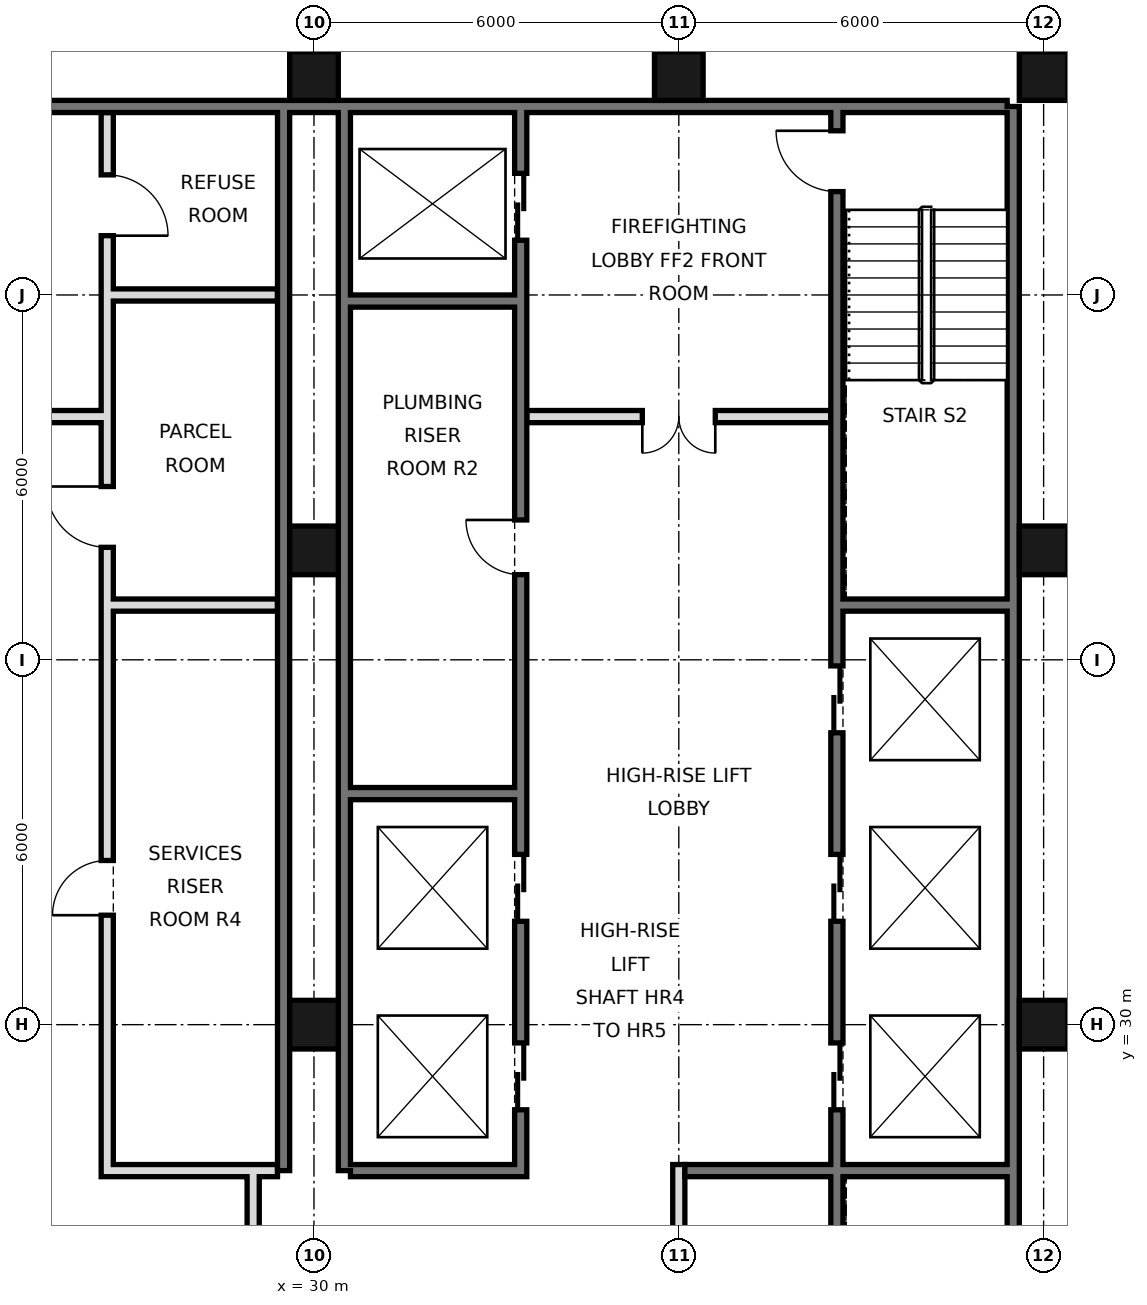
"""IFC4 building model, lengths in metres.
Left out: names, types, materials, properties, quantities, classifications, styles, units other than length and angle.
Written with IfcOpenShell. Run it as: python <this file> out.ifc"""

import sys

from ifc_helpers import new_model, si_unit, direction, frame, frame_2d, origin, origin_2d, place, context, subcontext, project, spatial, rectangle, hollow_rectangle, extrude, element, fill, save


model = new_model("IFC4")
c1 = context("Model", 3, precision=1e-05, world=origin(), true_north=direction((0.0, 1.0)))
c2 = subcontext(c1, "Body", "Model", "MODEL_VIEW")
j1 = project(units=[si_unit("LENGTHUNIT", "METRE"), si_unit("PLANEANGLEUNIT", "RADIAN")], contexts=[c1])
p1 = place(None, origin())
s1 = spatial("IfcSite", under=j1, at=p1, CompositionType="ELEMENT")
p2 = place(p1, origin())
s2 = spatial("IfcBuilding", under=s1, at=p2, CompositionType="ELEMENT")
p3 = place(p2, frame((0.0, 0.0, 195.6)))
s3 = spatial("IfcBuildingStorey", under=s2, at=p3, CompositionType="ELEMENT", Elevation=195.6)
for number, where, z_axis, x_axis in (
    (1, (30.0, 30.0, 0.0), (0.0, 0.0, 1.0), (1.0, 0.0, 0.0)),
    (2, (30.0, 37.8, 0.0), (0.0, 0.0, 1.0), (1.0, 0.0, 0.0)),
    (3, (30.0, 45.6, 0.0), (0.0, 0.0, 1.0), (1.0, 0.0, 0.0)),
    (4, (36.0, 45.6, 0.0), (0.0, 0.0, 1.0), (1.0, 0.0, 0.0)),
    (5, (42.0, 30.0, 0.0), (0.0, 0.0, 1.0), (1.0, 0.0, 0.0)),
    (6, (42.0, 37.8, 0.0), (0.0, 0.0, 1.0), (1.0, 0.0, 0.0)),
    (7, (42.0, 45.6, 0.0), (0.0, 0.0, 1.0), (1.0, 0.0, 0.0)),
):
    element("IfcColumn", number, at=place(p3, frame(where, z_axis=z_axis, x_axis=x_axis)), inside=s3, PredefinedType="COLUMN", context=c2, shape_type="SweptSolid", body=[
        extrude(hollow_rectangle(XDim=0.8, YDim=0.8, WallThickness=0.045, at=origin_2d()), origin(), (0.0, 0.0, 1.0), 3.6),
    ])
p4 = place(p3, frame((41.5, 21.6, 0.0), z_axis=(0.0, 0.0, 1.0), x_axis=(0.0, 1.0, 0.0)))
e8 = element("IfcWall", 8, at=p4, inside=s3, PredefinedType="SOLIDWALL", context=c2, shape_type="SweptSolid", body=[
    extrude(rectangle(XDim=23.5, YDim=0.2, at=frame_2d((11.75, 0.0))), origin(), (0.0, 0.0, 1.0), 3.42),
])
p5 = place(p3, frame((6.6, 45.1, 0.0), z_axis=(0.0, 0.0, 1.0), x_axis=(1.0, 0.0, 0.0)))
e9 = element("IfcWall", 9, at=p5, inside=s3, PredefinedType="SOLIDWALL", context=c2, shape_type="SweptSolid", body=[
    extrude(rectangle(XDim=34.8, YDim=0.2, at=frame_2d((17.4, 0.0))), origin(), (0.0, 0.0, 1.0), 3.42),
])
for number, where, z_axis, x_axis in (
    (10, (29.5, 27.6, 0.0), (0.0, 0.0, 1.0), (0.0, 1.0, 0.0)),
    (11, (30.5, 27.6, 0.0), (0.0, 0.0, 1.0), (0.0, 1.0, 0.0)),
):
    element("IfcWall", number, at=place(p3, frame(where, z_axis=z_axis, x_axis=x_axis)), inside=s3, PredefinedType="SOLIDWALL", context=c2, shape_type="SweptSolid", body=[
        extrude(rectangle(XDim=17.5, YDim=0.2, at=frame_2d((8.75, 0.0))), origin(), (0.0, 0.0, 1.0), 3.42),
    ])
p6 = place(p3, frame((29.0, 21.6, 0.0), z_axis=(0.0, 0.0, 1.0), x_axis=(0.0, 1.0, 0.0)))
e12 = element("IfcWall", 12, at=p6, inside=s3, PredefinedType="PARTITIONING", context=c2, shape_type="SweptSolid", body=[
    extrude(rectangle(XDim=6.0, YDim=0.2, at=frame_2d((3.0, 0.0))), origin(), (0.0, 0.0, 1.0), 3.42),
])
p7 = place(p6, frame((2.1, 0.0, 0.0)))
e13 = element("IfcOpeningElement", 13, at=p7, cuts=e12, PredefinedType="OPENING", context=c2, shape_type="SweptSolid", body=[
    extrude(rectangle(XDim=1.8, YDim=2.1, at=frame_2d((0.9, 1.05))), frame((0.0, 0.11, 0.0), z_axis=(0.0, -1.0, 0.0), x_axis=(1.0, 0.0, 0.0)), (0.0, 0.0, 1.0), 0.22),
])
p8 = place(p3, frame((26.6, 27.5, 0.0), z_axis=(0.0, 0.0, 1.0), x_axis=(0.0, 1.0, 0.0)))
e14 = element("IfcWall", 14, at=p8, inside=s3, PredefinedType="SOLIDWALL", context=c2, shape_type="SweptSolid", body=[
    extrude(rectangle(XDim=17.5, YDim=0.2, at=frame_2d((8.75, 0.0))), origin(), (0.0, 0.0, 1.0), 3.42),
])
p9 = place(p8, frame((4.3, 0.0, 0.0)))
e15 = element("IfcOpeningElement", 15, at=p9, cuts=e14, PredefinedType="OPENING", context=c2, shape_type="SweptSolid", body=[
    extrude(rectangle(XDim=0.9, YDim=2.1, at=frame_2d((0.45, 1.05))), frame((0.0, 0.11, 0.0), z_axis=(0.0, -1.0, 0.0), x_axis=(1.0, 0.0, 0.0)), (0.0, 0.0, 1.0), 0.22),
])
p10 = place(p8, frame((10.35, 0.0, 0.0)))
e16 = element("IfcOpeningElement", 16, at=p10, cuts=e14, PredefinedType="OPENING", context=c2, shape_type="SweptSolid", body=[
    extrude(rectangle(XDim=1.0, YDim=2.1, at=frame_2d((0.5, 1.05))), frame((0.0, 0.11, 0.0), z_axis=(0.0, -1.0, 0.0), x_axis=(1.0, 0.0, 0.0)), (0.0, 0.0, 1.0), 0.22),
])
p11 = place(p8, frame((15.475, 0.0, 0.0)))
e17 = element("IfcOpeningElement", 17, at=p11, cuts=e14, PredefinedType="OPENING", context=c2, shape_type="SweptSolid", body=[
    extrude(rectangle(XDim=1.0, YDim=2.1, at=frame_2d((0.5, 1.05))), frame((0.0, 0.11, 0.0), z_axis=(0.0, -1.0, 0.0), x_axis=(1.0, 0.0, 0.0)), (0.0, 0.0, 1.0), 0.22),
])
p12 = place(p3, frame((33.4, 27.5, 0.0), z_axis=(0.0, 0.0, 1.0), x_axis=(0.0, 1.0, 0.0)))
e18 = element("IfcWall", 18, at=p12, inside=s3, PredefinedType="SOLIDWALL", context=c2, shape_type="SweptSolid", body=[
    extrude(rectangle(XDim=17.5, YDim=0.2, at=frame_2d((8.75, 0.0))), origin(), (0.0, 0.0, 1.0), 3.42),
])
p13 = place(p12, frame((1.1, 0.0, 0.0)))
e19 = element("IfcOpeningElement", 19, at=p13, cuts=e18, PredefinedType="OPENING", context=c2, shape_type="SweptSolid", body=[
    extrude(rectangle(XDim=1.1, YDim=2.1, at=frame_2d((0.55, 1.05))), frame((0.0, 0.11, 0.0), z_axis=(0.0, -1.0, 0.0), x_axis=(1.0, 0.0, 0.0)), (0.0, 0.0, 1.0), 0.22),
])
p14 = place(p12, frame((4.2, 0.0, 0.0)))
e20 = element("IfcOpeningElement", 20, at=p14, cuts=e18, PredefinedType="OPENING", context=c2, shape_type="SweptSolid", body=[
    extrude(rectangle(XDim=1.1, YDim=2.1, at=frame_2d((0.55, 1.05))), frame((0.0, 0.11, 0.0), z_axis=(0.0, -1.0, 0.0), x_axis=(1.0, 0.0, 0.0)), (0.0, 0.0, 1.0), 0.22),
])
p15 = place(p12, frame((15.4, 0.0, 0.0)))
e21 = element("IfcOpeningElement", 21, at=p15, cuts=e18, PredefinedType="OPENING", context=c2, shape_type="SweptSolid", body=[
    extrude(rectangle(XDim=1.1, YDim=2.1, at=frame_2d((0.55, 1.05))), frame((0.0, 0.11, 0.0), z_axis=(0.0, -1.0, 0.0), x_axis=(1.0, 0.0, 0.0)), (0.0, 0.0, 1.0), 0.22),
])
p16 = place(p12, frame((9.9, 0.0, 0.0)))
e22 = element("IfcOpeningElement", 22, at=p16, cuts=e18, PredefinedType="OPENING", context=c2, shape_type="SweptSolid", body=[
    extrude(rectangle(XDim=0.9, YDim=2.1, at=frame_2d((0.45, 1.05))), frame((0.0, 0.11, 0.0), z_axis=(0.0, -1.0, 0.0), x_axis=(1.0, 0.0, 0.0)), (0.0, 0.0, 1.0), 0.22),
])
p17 = place(p3, frame((36.0, 21.6, 0.0), z_axis=(0.0, 0.0, 1.0), x_axis=(0.0, 1.0, 0.0)))
e23 = element("IfcWall", 23, at=p17, inside=s3, PredefinedType="PARTITIONING", context=c2, shape_type="SweptSolid", body=[
    extrude(rectangle(XDim=6.1, YDim=0.2, at=frame_2d((3.05, 0.0))), origin(), (0.0, 0.0, 1.0), 3.42),
])
p18 = place(p3, frame((38.6, 21.6, 0.0), z_axis=(0.0, 0.0, 1.0), x_axis=(0.0, 1.0, 0.0)))
e24 = element("IfcWall", 24, at=p18, inside=s3, PredefinedType="SOLIDWALL", context=c2, shape_type="SweptSolid", body=[
    extrude(rectangle(XDim=23.4, YDim=0.2, at=frame_2d((11.7, 0.0))), origin(), (0.0, 0.0, 1.0), 3.42),
])
p19 = place(p18, frame((7.0, 0.0, 0.0)))
e25 = element("IfcOpeningElement", 25, at=p19, cuts=e24, PredefinedType="OPENING", context=c2, shape_type="SweptSolid", body=[
    extrude(rectangle(XDim=1.1, YDim=2.1, at=frame_2d((0.55, 1.05))), frame((0.0, 0.11, 0.0), z_axis=(0.0, -1.0, 0.0), x_axis=(1.0, 0.0, 0.0)), (0.0, 0.0, 1.0), 0.22),
])
p20 = place(p18, frame((10.1, 0.0, 0.0)))
e26 = element("IfcOpeningElement", 26, at=p20, cuts=e24, PredefinedType="OPENING", context=c2, shape_type="SweptSolid", body=[
    extrude(rectangle(XDim=1.1, YDim=2.1, at=frame_2d((0.55, 1.05))), frame((0.0, 0.11, 0.0), z_axis=(0.0, -1.0, 0.0), x_axis=(1.0, 0.0, 0.0)), (0.0, 0.0, 1.0), 0.22),
])
p21 = place(p18, frame((13.2, 0.0, 0.0)))
e27 = element("IfcOpeningElement", 27, at=p21, cuts=e24, PredefinedType="OPENING", context=c2, shape_type="SweptSolid", body=[
    extrude(rectangle(XDim=1.1, YDim=2.1, at=frame_2d((0.55, 1.05))), frame((0.0, 0.11, 0.0), z_axis=(0.0, -1.0, 0.0), x_axis=(1.0, 0.0, 0.0)), (0.0, 0.0, 1.0), 0.22),
])
p22 = place(p18, frame((22.1, 0.0, 0.0)))
e28 = element("IfcOpeningElement", 28, at=p22, cuts=e24, PredefinedType="OPENING", context=c2, shape_type="SweptSolid", body=[
    extrude(rectangle(XDim=1.0, YDim=2.1, at=frame_2d((0.5, 1.05))), frame((0.0, 0.11, 0.0), z_axis=(0.0, -1.0, 0.0), x_axis=(1.0, 0.0, 0.0)), (0.0, 0.0, 1.0), 0.22),
])
p23 = place(p18, frame((0.175, 0.0, 0.0)))
e29 = element("IfcOpeningElement", 29, at=p23, cuts=e24, PredefinedType="OPENING", context=c2, shape_type="SweptSolid", body=[
    extrude(rectangle(XDim=0.9, YDim=2.1, at=frame_2d((0.45, 1.05))), frame((0.0, 0.11, 0.0), z_axis=(0.0, -1.0, 0.0), x_axis=(1.0, 0.0, 0.0)), (0.0, 0.0, 1.0), 0.22),
])
for number, where, z_axis, x_axis in (
    (30, (26.7, 27.6, 0.0), (0.0, 0.0, 1.0), (1.0, 0.0, 0.0)),
    (31, (30.6, 27.6, 0.0), (0.0, 0.0, 1.0), (1.0, 0.0, 0.0)),
):
    element("IfcWall", number, at=place(p3, frame(where, z_axis=z_axis, x_axis=x_axis)), inside=s3, PredefinedType="SOLIDWALL", context=c2, shape_type="SweptSolid", body=[
        extrude(rectangle(XDim=2.7, YDim=0.2, at=frame_2d((1.35, 0.0))), origin(), (0.0, 0.0, 1.0), 3.42),
    ])
p24 = place(p3, frame((36.1, 27.6, 0.0), z_axis=(0.0, 0.0, 1.0), x_axis=(1.0, 0.0, 0.0)))
e32 = element("IfcWall", 32, at=p24, inside=s3, PredefinedType="SOLIDWALL", context=c2, shape_type="SweptSolid", body=[
    extrude(rectangle(XDim=5.3, YDim=0.2, at=frame_2d((2.65, 0.0))), origin(), (0.0, 0.0, 1.0), 3.42),
])
for number, where, z_axis, x_axis in (
    (33, (30.6, 33.8, 0.0), (0.0, 0.0, 1.0), (1.0, 0.0, 0.0)),
    (34, (26.7, 36.9, 0.0), (0.0, 0.0, 1.0), (1.0, 0.0, 0.0)),
    (35, (38.7, 36.9, 0.0), (0.0, 0.0, 1.0), (1.0, 0.0, 0.0)),
):
    element("IfcWall", number, at=place(p3, frame(where, z_axis=z_axis, x_axis=x_axis)), inside=s3, PredefinedType="SOLIDWALL", context=c2, shape_type="SweptSolid", body=[
        extrude(rectangle(XDim=2.7, YDim=0.2, at=frame_2d((1.35, 0.0))), origin(), (0.0, 0.0, 1.0), 3.42),
    ])
p25 = place(p3, frame((21.5, 40.0, 0.0), z_axis=(0.0, 0.0, 1.0), x_axis=(1.0, 0.0, 0.0)))
e36 = element("IfcWall", 36, at=p25, inside=s3, PredefinedType="PARTITIONING", context=c2, shape_type="SweptSolid", body=[
    extrude(rectangle(XDim=5.0, YDim=0.2, at=frame_2d((2.5, 0.0))), origin(), (0.0, 0.0, 1.0), 3.42),
])
p26 = place(p25, frame((1.9, 0.0, 0.0)))
e37 = element("IfcOpeningElement", 37, at=p26, cuts=e36, PredefinedType="OPENING", context=c2, shape_type="SweptSolid", body=[
    extrude(rectangle(XDim=1.2, YDim=2.1, at=frame_2d((0.6, 1.05))), frame((0.0, 0.11, 0.0), z_axis=(0.0, -1.0, 0.0), x_axis=(1.0, 0.0, 0.0)), (0.0, 0.0, 1.0), 0.22),
])
p27 = place(p3, frame((33.5, 40.0, 0.0), z_axis=(0.0, 0.0, 1.0), x_axis=(1.0, 0.0, 0.0)))
e38 = element("IfcWall", 38, at=p27, inside=s3, PredefinedType="PARTITIONING", context=c2, shape_type="SweptSolid", body=[
    extrude(rectangle(XDim=5.0, YDim=0.2, at=frame_2d((2.5, 0.0))), origin(), (0.0, 0.0, 1.0), 3.42),
])
p28 = place(p27, frame((1.9, 0.0, 0.0)))
e39 = element("IfcOpeningElement", 39, at=p28, cuts=e38, PredefinedType="OPENING", context=c2, shape_type="SweptSolid", body=[
    extrude(rectangle(XDim=1.2, YDim=2.1, at=frame_2d((0.6, 1.05))), frame((0.0, 0.11, 0.0), z_axis=(0.0, -1.0, 0.0), x_axis=(1.0, 0.0, 0.0)), (0.0, 0.0, 1.0), 0.22),
])
p29 = place(p3, frame((30.6, 41.9, 0.0), z_axis=(0.0, 0.0, 1.0), x_axis=(1.0, 0.0, 0.0)))
e40 = element("IfcWall", 40, at=p29, inside=s3, PredefinedType="SOLIDWALL", context=c2, shape_type="SweptSolid", body=[
    extrude(rectangle(XDim=2.7, YDim=0.2, at=frame_2d((1.35, 0.0))), origin(), (0.0, 0.0, 1.0), 3.42),
])
p30 = place(p3, frame((26.7, 42.0, 0.0), z_axis=(0.0, 0.0, 1.0), x_axis=(1.0, 0.0, 0.0)))
e41 = element("IfcWall", 41, at=p30, inside=s3, PredefinedType="PARTITIONING", context=c2, shape_type="SweptSolid", body=[
    extrude(rectangle(XDim=2.7, YDim=0.2, at=frame_2d((1.35, 0.0))), origin(), (0.0, 0.0, 1.0), 3.42),
])
p31 = place(p28, frame((1.2, 0.0, 0.0), z_axis=(0.0, 0.0, 1.0), x_axis=(-1.0, 0.0, 0.0)))
e42 = element("IfcDoor", 42, at=p31, inside=s3, OperationType="DOUBLE_DOOR_SINGLE_SWING", PredefinedType="DOOR", context=c2, shape_type="SweptSolid", body=[
    extrude(rectangle(XDim=1.2, YDim=2.1, at=frame_2d((0.6, 1.05))), frame((0.0, 0.025, 0.0), z_axis=(0.0, -1.0, 0.0), x_axis=(1.0, 0.0, 0.0)), (0.0, 0.0, 1.0), 0.05),
])
fill(e39, e42)
p32 = place(p19, origin())
e43 = element("IfcDoor", 43, at=p32, inside=s3, OperationType="DOUBLE_DOOR_SLIDING", PredefinedType="DOOR", context=c2, shape_type="SweptSolid", body=[
    extrude(rectangle(XDim=1.1, YDim=2.1, at=frame_2d((0.55, 1.05))), frame((0.0, 0.025, 0.0), z_axis=(0.0, -1.0, 0.0), x_axis=(1.0, 0.0, 0.0)), (0.0, 0.0, 1.0), 0.05),
])
fill(e25, e43)
p33 = place(p20, origin())
e44 = element("IfcDoor", 44, at=p33, inside=s3, OperationType="DOUBLE_DOOR_SLIDING", PredefinedType="DOOR", context=c2, shape_type="SweptSolid", body=[
    extrude(rectangle(XDim=1.1, YDim=2.1, at=frame_2d((0.55, 1.05))), frame((0.0, 0.025, 0.0), z_axis=(0.0, -1.0, 0.0), x_axis=(1.0, 0.0, 0.0)), (0.0, 0.0, 1.0), 0.05),
])
fill(e26, e44)
p34 = place(p21, origin())
e45 = element("IfcDoor", 45, at=p34, inside=s3, OperationType="DOUBLE_DOOR_SLIDING", PredefinedType="DOOR", context=c2, shape_type="SweptSolid", body=[
    extrude(rectangle(XDim=1.1, YDim=2.1, at=frame_2d((0.55, 1.05))), frame((0.0, 0.025, 0.0), z_axis=(0.0, -1.0, 0.0), x_axis=(1.0, 0.0, 0.0)), (0.0, 0.0, 1.0), 0.05),
])
fill(e27, e45)
p35 = place(p13, origin())
e46 = element("IfcDoor", 46, at=p35, inside=s3, OperationType="DOUBLE_DOOR_SLIDING", PredefinedType="DOOR", context=c2, shape_type="SweptSolid", body=[
    extrude(rectangle(XDim=1.1, YDim=2.1, at=frame_2d((0.55, 1.05))), frame((0.0, 0.025, 0.0), z_axis=(0.0, -1.0, 0.0), x_axis=(1.0, 0.0, 0.0)), (0.0, 0.0, 1.0), 0.05),
])
fill(e19, e46)
p36 = place(p14, origin())
e47 = element("IfcDoor", 47, at=p36, inside=s3, OperationType="DOUBLE_DOOR_SLIDING", PredefinedType="DOOR", context=c2, shape_type="SweptSolid", body=[
    extrude(rectangle(XDim=1.1, YDim=2.1, at=frame_2d((0.55, 1.05))), frame((0.0, 0.025, 0.0), z_axis=(0.0, -1.0, 0.0), x_axis=(1.0, 0.0, 0.0)), (0.0, 0.0, 1.0), 0.05),
])
fill(e20, e47)
p37 = place(p15, origin())
e48 = element("IfcDoor", 48, at=p37, inside=s3, OperationType="DOUBLE_DOOR_SLIDING", PredefinedType="DOOR", context=c2, shape_type="SweptSolid", body=[
    extrude(rectangle(XDim=1.1, YDim=2.1, at=frame_2d((0.55, 1.05))), frame((0.0, 0.025, 0.0), z_axis=(0.0, -1.0, 0.0), x_axis=(1.0, 0.0, 0.0)), (0.0, 0.0, 1.0), 0.05),
])
fill(e21, e48)
p38 = place(p22, frame((1.0, 0.0, 0.0), z_axis=(0.0, 0.0, 1.0), x_axis=(-1.0, 0.0, 0.0)))
e49 = element("IfcDoor", 49, at=p38, inside=s3, OperationType="SINGLE_SWING_LEFT", PredefinedType="DOOR", context=c2, shape_type="SweptSolid", body=[
    extrude(rectangle(XDim=1.0, YDim=2.1, at=frame_2d((0.5, 1.05))), frame((0.0, 0.025, 0.0), z_axis=(0.0, -1.0, 0.0), x_axis=(1.0, 0.0, 0.0)), (0.0, 0.0, 1.0), 0.05),
])
fill(e28, e49)
p39 = place(p16, frame((0.9, 0.0, 0.0), z_axis=(0.0, 0.0, 1.0), x_axis=(-1.0, 0.0, 0.0)))
e50 = element("IfcDoor", 50, at=p39, inside=s3, OperationType="SINGLE_SWING_LEFT", PredefinedType="DOOR", context=c2, shape_type="SweptSolid", body=[
    extrude(rectangle(XDim=0.9, YDim=2.1, at=frame_2d((0.45, 1.05))), frame((0.0, 0.025, 0.0), z_axis=(0.0, -1.0, 0.0), x_axis=(1.0, 0.0, 0.0)), (0.0, 0.0, 1.0), 0.05),
])
fill(e22, e50)
p40 = place(p9, origin())
e51 = element("IfcDoor", 51, at=p40, inside=s3, OperationType="SINGLE_SWING_LEFT", PredefinedType="DOOR", context=c2, shape_type="SweptSolid", body=[
    extrude(rectangle(XDim=0.9, YDim=2.1, at=frame_2d((0.45, 1.05))), frame((0.0, 0.025, 0.0), z_axis=(0.0, -1.0, 0.0), x_axis=(1.0, 0.0, 0.0)), (0.0, 0.0, 1.0), 0.05),
])
fill(e15, e51)
p41 = place(p10, frame((1.0, 0.0, 0.0), z_axis=(0.0, 0.0, 1.0), x_axis=(-1.0, 0.0, 0.0)))
e52 = element("IfcDoor", 52, at=p41, inside=s3, OperationType="SINGLE_SWING_LEFT", PredefinedType="DOOR", context=c2, shape_type="SweptSolid", body=[
    extrude(rectangle(XDim=1.0, YDim=2.1, at=frame_2d((0.5, 1.05))), frame((0.0, 0.025, 0.0), z_axis=(0.0, -1.0, 0.0), x_axis=(1.0, 0.0, 0.0)), (0.0, 0.0, 1.0), 0.05),
])
fill(e16, e52)
p42 = place(p11, frame((1.0, 0.0, 0.0), z_axis=(0.0, 0.0, 1.0), x_axis=(-1.0, 0.0, 0.0)))
e53 = element("IfcDoor", 53, at=p42, inside=s3, OperationType="SINGLE_SWING_RIGHT", PredefinedType="DOOR", context=c2, shape_type="SweptSolid", body=[
    extrude(rectangle(XDim=1.0, YDim=2.1, at=frame_2d((0.5, 1.05))), frame((0.0, 0.025, 0.0), z_axis=(0.0, -1.0, 0.0), x_axis=(1.0, 0.0, 0.0)), (0.0, 0.0, 1.0), 0.05),
])
fill(e17, e53)
save(model, sys.argv[1])
